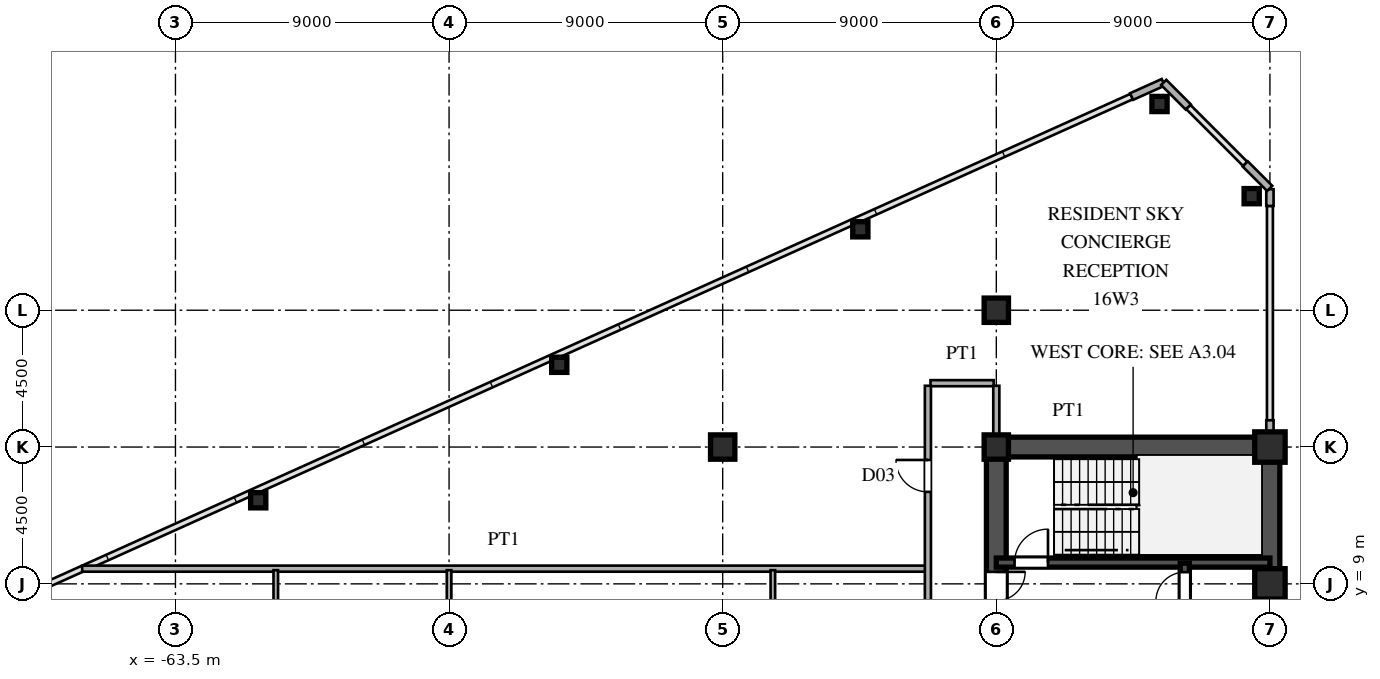
"""IFC4 building model, lengths in metres.
Left out: names, types, materials, properties, quantities, classifications, styles, units other than length and angle.
Written with IfcOpenShell. Run it as: python <this file> out.ifc"""

import sys

from ifc_helpers import new_model, si_unit, direction, frame, frame_2d, origin, origin_2d, place, context, subcontext, project, spatial, rectangle, hollow_rectangle, i_section, extrude, source, transform, mapped, element, fill, save


model = new_model("IFC4")
c1 = context("Model", 3, precision=1e-05, world=origin(), true_north=direction((0.0, 1.0)))
c2 = subcontext(c1, "Body", "Model", "MODEL_VIEW")
j1 = project(units=[si_unit("LENGTHUNIT", "METRE"), si_unit("PLANEANGLEUNIT", "RADIAN")], contexts=[c1])
p1 = place(None, origin())
s1 = spatial("IfcSite", under=j1, at=p1, CompositionType="ELEMENT")
p2 = place(p1, origin())
s2 = spatial("IfcBuilding", under=s1, at=p2, CompositionType="ELEMENT")
p3 = place(p2, frame((0.0, 0.0, 62.1)))
s3 = spatial("IfcBuildingStorey", under=s2, at=p3, CompositionType="ELEMENT", Elevation=62.1)
m1 = source(origin(), c2, "Body", "SweptSolid", [
    extrude(hollow_rectangle(XDim=1.0, YDim=1.0, WallThickness=0.042, at=origin_2d()), origin(), (0.0, 0.0, 1.0), 3.6),
])
for number, where, z_axis, x_axis in (
    (1, (-27.5, 9.0, 0.0), (0.0, 0.0, 1.0), (1.0, 0.0, 0.0)),
    (2, (-27.5, 13.5, 0.0), (0.0, 0.0, 1.0), (1.0, 0.0, 0.0)),
):
    element("IfcColumn", number, at=place(p3, frame(where, z_axis=z_axis, x_axis=x_axis)), inside=s3, PredefinedType="COLUMN", context=c2, shape_type="MappedRepresentation", body=[
        mapped(m1, transform((0.0, 0.0, 0.0), scale=1.0)),
    ])
m2 = source(origin(), c2, "Body", "SweptSolid", [
    extrude(i_section(OverallWidth=0.8, OverallDepth=0.8, WebThickness=0.032, FlangeThickness=0.05, at=origin_2d()), origin(), (0.0, 0.0, 1.0), 3.6),
])
for number, where, z_axis, x_axis in (
    (3, (-36.5, 13.5, 0.0), (0.0, 0.0, 1.0), (1.0, 0.0, 0.0)),
    (4, (-36.5, 18.0, 0.0), (0.0, 0.0, 1.0), (1.0, 0.0, 0.0)),
    (5, (-45.5, 13.5, 0.0), (0.0, 0.0, 1.0), (1.0, 0.0, 0.0)),
):
    element("IfcColumn", number, at=place(p3, frame(where, z_axis=z_axis, x_axis=x_axis)), inside=s3, PredefinedType="COLUMN", context=c2, shape_type="MappedRepresentation", body=[
        mapped(m2, transform((0.0, 0.0, 0.0), scale=1.0)),
    ])
m3 = source(origin(), c2, "Body", "SweptSolid", [
    extrude(hollow_rectangle(XDim=0.5, YDim=0.5, WallThickness=0.02, at=origin_2d()), origin(), (0.0, 0.0, 1.0), 3.6),
])
for number, where, z_axis, x_axis in (
    (6, (-28.1, 21.751, 0.0), (0.0, 0.0, 1.0), (1.0, 0.0, 0.0)),
    (7, (-31.131, 24.783, 0.0), (0.0, 0.0, 1.0), (1.0, 0.0, 0.0)),
    (8, (-40.973, 20.661, 0.0), (0.0, 0.0, 1.0), (1.0, 0.0, 0.0)),
    (9, (-50.875, 16.205, 0.0), (0.0, 0.0, 1.0), (1.0, 0.0, 0.0)),
    (10, (-60.778, 11.749, 0.0), (0.0, 0.0, 1.0), (1.0, 0.0, 0.0)),
):
    element("IfcColumn", number, at=place(p3, frame(where, z_axis=z_axis, x_axis=x_axis)), inside=s3, PredefinedType="COLUMN", context=c2, shape_type="MappedRepresentation", body=[
        mapped(m3, transform((0.0, 0.0, 0.0), scale=1.0)),
    ])
p4 = place(p3, frame((-27.5, 13.83, 0.0), z_axis=(0.0, 0.0, 1.0), x_axis=(0.0, 1.0, 0.0)))
e11 = element("IfcWall", 11, at=p4, inside=s3, PredefinedType="SOLIDWALL", context=c2, shape_type="SweptSolid", body=[
    extrude(rectangle(XDim=0.55, YDim=0.24, at=frame_2d((0.275, 0.0))), origin(), (0.0, 0.0, 1.0), 2.88),
])
p5 = place(p3, frame((-27.5, 21.43, 0.0), z_axis=(0.0, 0.0, 1.0), x_axis=(0.0, 1.0, 0.0)))
e12 = element("IfcWall", 12, at=p5, inside=s3, PredefinedType="SOLIDWALL", context=c2, shape_type="SweptSolid", body=[
    extrude(rectangle(XDim=0.55, YDim=0.24, at=frame_2d((0.275, 0.0))), origin(), (0.0, 0.0, 1.0), 3.38),
])
for number, where, z_axis, x_axis in (
    (13, (-27.507, 22.007, 0.0), (0.0, 0.0, 1.0), (-0.707, 0.707, 0.0)),
    (14, (-30.187, 24.687, 0.0), (0.0, 0.0, 1.0), (-0.707, 0.707, 0.0)),
):
    element("IfcWall", number, at=place(p3, frame(where, z_axis=z_axis, x_axis=x_axis)), inside=s3, PredefinedType="SOLIDWALL", context=c2, shape_type="SweptSolid", body=[
        extrude(rectangle(XDim=1.14, YDim=0.24, at=frame_2d((0.57, 0.0))), origin(), (0.0, 0.0, 1.0), 3.38),
    ])
p6 = place(p3, frame((-31.009, 25.496, 0.0), z_axis=(0.0, 0.0, 1.0), x_axis=(-0.911929519623, -0.410346866979, 0.0)))
e15 = element("IfcWall", 15, at=p6, inside=s3, PredefinedType="SOLIDWALL", context=c2, shape_type="SweptSolid", body=[
    extrude(rectangle(XDim=1.14, YDim=0.24, at=frame_2d((0.57, 0.0))), origin(), (0.0, 0.0, 1.0), 3.38),
])
p7 = place(p3, frame((-27.5, 1.3, 0.0), z_axis=(0.0, 0.0, 1.0), x_axis=(0.0, 1.0, 0.0)))
e16 = element("IfcWall", 16, at=p7, inside=s3, PredefinedType="SHEAR", context=c2, shape_type="SweptSolid", body=[
    extrude(rectangle(XDim=12.2, YDim=0.65, at=frame_2d((6.1, 0.0))), origin(), (0.0, 0.0, 1.0), 3.38),
])
p8 = place(p3, frame((-36.5, 13.5, 0.0), z_axis=(0.0, 0.0, 1.0), x_axis=(1.0, 0.0, 0.0)))
e17 = element("IfcWall", 17, at=p8, inside=s3, PredefinedType="SHEAR", context=c2, shape_type="SweptSolid", body=[
    extrude(rectangle(XDim=9.0, YDim=0.65, at=frame_2d((4.5, 0.0))), origin(), (0.0, 0.0, 1.0), 3.38),
])
p9 = place(p3, frame((-36.5, 8.2, 0.0), z_axis=(0.0, 0.0, 1.0), x_axis=(0.0, 1.0, 0.0)))
e18 = element("IfcWall", 18, at=p9, inside=s3, PredefinedType="SHEAR", context=c2, shape_type="SweptSolid", body=[
    extrude(rectangle(XDim=5.45, YDim=0.65, at=frame_2d((2.725, 0.0))), origin(), (0.0, 0.0, 1.0), 3.38),
])
p10 = place(p9, frame((0.245, 0.0, 0.0)))
e19 = element("IfcOpeningElement", 19, at=p10, cuts=e18, PredefinedType="OPENING", context=c2, shape_type="SweptSolid", body=[
    extrude(rectangle(XDim=0.95, YDim=2.15, at=frame_2d((0.475, 1.075))), frame((0.0, 0.335, 0.0), z_axis=(0.0, -1.0, 0.0), x_axis=(1.0, 0.0, 0.0)), (0.0, 0.0, 1.0), 0.67),
])
p11 = place(p3, frame((-36.5, 9.7, 0.0), z_axis=(0.0, 0.0, 1.0), x_axis=(1.0, 0.0, 0.0)))
e20 = element("IfcWall", 20, at=p11, inside=s3, PredefinedType="SHEAR", context=c2, shape_type="SweptSolid", body=[
    extrude(rectangle(XDim=9.0, YDim=0.3, at=frame_2d((4.5, 0.0))), origin(), (0.0, 0.0, 1.0), 3.38),
])
p12 = place(p11, frame((0.6, 0.0, 0.0)))
e21 = element("IfcOpeningElement", 21, at=p12, cuts=e20, PredefinedType="OPENING", context=c2, shape_type="SweptSolid", body=[
    extrude(rectangle(XDim=1.1, YDim=2.2, at=frame_2d((0.55, 1.1))), frame((0.0, 0.16, 0.0), z_axis=(0.0, -1.0, 0.0), x_axis=(1.0, 0.0, 0.0)), (0.0, 0.0, 1.0), 0.32),
])
p13 = place(p3, frame((-30.3, 8.15, 0.0), z_axis=(0.0, 0.0, 1.0), x_axis=(0.0, 1.0, 0.0)))
e22 = element("IfcWall", 22, at=p13, inside=s3, PredefinedType="SHEAR", context=c2, shape_type="SweptSolid", body=[
    extrude(rectangle(XDim=1.53, YDim=0.3, at=frame_2d((0.765, 0.0))), origin(), (0.0, 0.0, 1.0), 3.38),
])
p14 = place(p13, frame((0.285, 0.0, 0.0)))
e23 = element("IfcOpeningElement", 23, at=p14, cuts=e22, PredefinedType="OPENING", context=c2, shape_type="SweptSolid", body=[
    extrude(rectangle(XDim=0.95, YDim=2.15, at=frame_2d((0.475, 1.075))), frame((0.0, 0.16, 0.0), z_axis=(0.0, -1.0, 0.0), x_axis=(1.0, 0.0, 0.0)), (0.0, 0.0, 1.0), 0.32),
])
p15 = place(p3, frame((-66.568, 9.5, 0.0), z_axis=(0.0, 0.0, 1.0), x_axis=(1.0, 0.0, 0.0)))
e24 = element("IfcWall", 24, at=p15, inside=s3, PredefinedType="PARTITIONING", context=c2, shape_type="SweptSolid", body=[
    extrude(rectangle(XDim=27.738, YDim=0.2, at=frame_2d((13.869, 0.0))), origin(), (0.0, 0.0, 1.0), 3.38),
])
p16 = place(p3, frame((-38.665, 15.6, 0.0), z_axis=(0.0, 0.0, 1.0), x_axis=(1.0, 0.0, 0.0)))
e25 = element("IfcWall", 25, at=p16, inside=s3, PredefinedType="PARTITIONING", context=c2, shape_type="SweptSolid", body=[
    extrude(rectangle(XDim=2.08, YDim=0.2, at=frame_2d((1.04, 0.0))), origin(), (0.0, 0.0, 1.0), 3.38),
])
p17 = place(p3, frame((-60.2, -9.522, 0.0), z_axis=(0.0, 0.0, 1.0), x_axis=(0.0, 1.0, 0.0)))
e26 = element("IfcWall", 26, at=p17, inside=s3, PredefinedType="PARTITIONING", context=c2, shape_type="SweptSolid", body=[
    extrude(rectangle(XDim=18.972, YDim=0.15, at=frame_2d((9.486, 0.0))), origin(), (0.0, 0.0, 1.0), 3.38),
])
p18 = place(p17, frame((2.011, 0.0, 0.0)))
e27 = element("IfcOpeningElement", 27, at=p18, cuts=e26, PredefinedType="OPENING", context=c2, shape_type="SweptSolid", body=[
    extrude(rectangle(XDim=0.95, YDim=2.15, at=frame_2d((0.475, 1.075))), frame((0.0, 0.085, 0.0), z_axis=(0.0, -1.0, 0.0), x_axis=(1.0, 0.0, 0.0)), (0.0, 0.0, 1.0), 0.17),
])
p19 = place(p17, frame((6.88, 0.0, 0.0)))
e28 = element("IfcOpeningElement", 28, at=p19, cuts=e26, PredefinedType="OPENING", context=c2, shape_type="SweptSolid", body=[
    extrude(rectangle(XDim=0.95, YDim=2.15, at=frame_2d((0.475, 1.075))), frame((0.0, 0.085, 0.0), z_axis=(0.0, -1.0, 0.0), x_axis=(1.0, 0.0, 0.0)), (0.0, 0.0, 1.0), 0.17),
])
p20 = place(p17, frame((11.547, 0.0, 0.0)))
e29 = element("IfcOpeningElement", 29, at=p20, cuts=e26, PredefinedType="OPENING", context=c2, shape_type="SweptSolid", body=[
    extrude(rectangle(XDim=0.95, YDim=2.15, at=frame_2d((0.475, 1.075))), frame((0.0, 0.085, 0.0), z_axis=(0.0, -1.0, 0.0), x_axis=(1.0, 0.0, 0.0)), (0.0, 0.0, 1.0), 0.17),
])
p21 = place(p17, frame((16.214, 0.0, 0.0)))
e30 = element("IfcOpeningElement", 30, at=p21, cuts=e26, PredefinedType="OPENING", context=c2, shape_type="SweptSolid", body=[
    extrude(rectangle(XDim=0.95, YDim=2.15, at=frame_2d((0.475, 1.075))), frame((0.0, 0.085, 0.0), z_axis=(0.0, -1.0, 0.0), x_axis=(1.0, 0.0, 0.0)), (0.0, 0.0, 1.0), 0.17),
])
p22 = place(p3, frame((-54.5, -14.595, 0.0), z_axis=(0.0, 0.0, 1.0), x_axis=(0.0, 1.0, 0.0)))
e31 = element("IfcWall", 31, at=p22, inside=s3, PredefinedType="PARTITIONING", context=c2, shape_type="SweptSolid", body=[
    extrude(rectangle(XDim=24.045, YDim=0.15, at=frame_2d((12.022, 0.0))), origin(), (0.0, 0.0, 1.0), 2.68),
])
p23 = place(p22, frame((2.011, 0.0, 0.0)))
e32 = element("IfcOpeningElement", 32, at=p23, cuts=e31, PredefinedType="OPENING", context=c2, shape_type="SweptSolid", body=[
    extrude(rectangle(XDim=0.95, YDim=2.15, at=frame_2d((0.475, 1.075))), frame((0.0, 0.085, 0.0), z_axis=(0.0, -1.0, 0.0), x_axis=(1.0, 0.0, 0.0)), (0.0, 0.0, 1.0), 0.17),
])
p24 = place(p22, frame((7.084, 0.0, 0.0)))
e33 = element("IfcOpeningElement", 33, at=p24, cuts=e31, PredefinedType="OPENING", context=c2, shape_type="SweptSolid", body=[
    extrude(rectangle(XDim=0.95, YDim=2.15, at=frame_2d((0.475, 1.075))), frame((0.0, 0.085, 0.0), z_axis=(0.0, -1.0, 0.0), x_axis=(1.0, 0.0, 0.0)), (0.0, 0.0, 1.0), 0.17),
])
p25 = place(p22, frame((16.62, 0.0, 0.0)))
e34 = element("IfcOpeningElement", 34, at=p25, cuts=e31, PredefinedType="OPENING", context=c2, shape_type="SweptSolid", body=[
    extrude(rectangle(XDim=0.95, YDim=2.15, at=frame_2d((0.475, 1.075))), frame((0.0, 0.085, 0.0), z_axis=(0.0, -1.0, 0.0), x_axis=(1.0, 0.0, 0.0)), (0.0, 0.0, 1.0), 0.17),
])
p26 = place(p3, frame((-43.85, 5.352, 0.0), z_axis=(0.0, 0.0, 1.0), x_axis=(0.0, 1.0, 0.0)))
e35 = element("IfcWall", 35, at=p26, inside=s3, PredefinedType="PARTITIONING", context=c2, shape_type="SweptSolid", body=[
    extrude(rectangle(XDim=4.098, YDim=0.15, at=frame_2d((2.049, 0.0))), origin(), (0.0, 0.0, 1.0), 3.38),
])
p27 = place(p3, frame((-38.75, -15.515, 0.0), z_axis=(0.0, 0.0, 1.0), x_axis=(0.0, 1.0, 0.0)))
e36 = element("IfcWall", 36, at=p27, inside=s3, PredefinedType="PARTITIONING", context=c2, shape_type="SweptSolid", body=[
    extrude(rectangle(XDim=31.03, YDim=0.2, at=frame_2d((15.515, 0.0))), origin(), (0.0, 0.0, 1.0), 3.38),
])
p28 = place(p27, frame((4.913, 0.0, 0.0)))
e37 = element("IfcOpeningElement", 37, at=p28, cuts=e36, PredefinedType="OPENING", context=c2, shape_type="SweptSolid", body=[
    extrude(rectangle(XDim=1.05, YDim=2.25, at=frame_2d((0.525, 1.125))), frame((0.0, 0.11, 0.0), z_axis=(0.0, -1.0, 0.0), x_axis=(1.0, 0.0, 0.0)), (0.0, 0.0, 1.0), 0.22),
])
p29 = place(p27, frame((17.28, 0.0, 0.0)))
e38 = element("IfcOpeningElement", 38, at=p29, cuts=e36, PredefinedType="OPENING", context=c2, shape_type="SweptSolid", body=[
    extrude(rectangle(XDim=1.05, YDim=2.25, at=frame_2d((0.525, 1.125))), frame((0.0, 0.11, 0.0), z_axis=(0.0, -1.0, 0.0), x_axis=(1.0, 0.0, 0.0)), (0.0, 0.0, 1.0), 0.22),
])
p30 = place(p27, frame((27.54, 0.0, 0.0)))
e39 = element("IfcOpeningElement", 39, at=p30, cuts=e36, PredefinedType="OPENING", context=c2, shape_type="SweptSolid", body=[
    extrude(rectangle(XDim=1.05, YDim=2.25, at=frame_2d((0.525, 1.125))), frame((0.0, 0.11, 0.0), z_axis=(0.0, -1.0, 0.0), x_axis=(1.0, 0.0, 0.0)), (0.0, 0.0, 1.0), 0.22),
])
p31 = place(p3, frame((-36.5, 13.83, 0.0), z_axis=(0.0, 0.0, 1.0), x_axis=(0.0, 1.0, 0.0)))
e40 = element("IfcWall", 40, at=p31, inside=s3, PredefinedType="PARTITIONING", context=c2, shape_type="SweptSolid", body=[
    extrude(rectangle(XDim=1.685, YDim=0.2, at=frame_2d((0.842, 0.0))), origin(), (0.0, 0.0, 1.0), 2.68),
])
m4 = source(origin(), c2, "Body", "SweptSolid", [
    extrude(rectangle(XDim=0.95, YDim=2.15, at=frame_2d((0.475, 1.075))), frame((0.0, 0.025, 0.0), z_axis=(0.0, -1.0, 0.0), x_axis=(1.0, 0.0, 0.0)), (0.0, 0.0, 1.0), 0.05),
])
p32 = place(p10, frame((0.95, 0.0, 0.0), z_axis=(0.0, 0.0, 1.0), x_axis=(-1.0, 0.0, 0.0)))
e41 = element("IfcDoor", 41, at=p32, inside=s3, OperationType="SINGLE_SWING_RIGHT", PredefinedType="DOOR", context=c2, shape_type="MappedRepresentation", body=[
    mapped(m4, transform((0.0, 0.0, 0.0), scale=1.0)),
])
fill(e19, e41)
m5 = source(origin(), c2, "Body", "SweptSolid", [
    extrude(rectangle(XDim=1.1, YDim=2.2, at=frame_2d((0.55, 1.1))), frame((0.0, 0.025, 0.0), z_axis=(0.0, -1.0, 0.0), x_axis=(1.0, 0.0, 0.0)), (0.0, 0.0, 1.0), 0.05),
])
p33 = place(p12, origin())
e42 = element("IfcDoor", 42, at=p33, inside=s3, OperationType="SINGLE_SWING_RIGHT", PredefinedType="DOOR", context=c2, shape_type="MappedRepresentation", body=[
    mapped(m5, transform((0.0, 0.0, 0.0), scale=1.0)),
])
fill(e21, e42)
p34 = place(p14, origin())
e43 = element("IfcDoor", 43, at=p34, inside=s3, OperationType="SINGLE_SWING_LEFT", PredefinedType="DOOR", context=c2, shape_type="MappedRepresentation", body=[
    mapped(m4, transform((0.0, 0.0, 0.0), scale=1.0)),
])
fill(e23, e43)
m6 = source(origin(), c2, "Body", "SweptSolid", [
    extrude(rectangle(XDim=1.05, YDim=2.25, at=frame_2d((0.525, 1.125))), frame((0.0, 0.025, 0.0), z_axis=(0.0, -1.0, 0.0), x_axis=(1.0, 0.0, 0.0)), (0.0, 0.0, 1.0), 0.05),
])
p35 = place(p30, origin())
e44 = element("IfcDoor", 44, at=p35, inside=s3, OperationType="SINGLE_SWING_RIGHT", PredefinedType="DOOR", context=c2, shape_type="MappedRepresentation", body=[
    mapped(m6, transform((0.0, 0.0, 0.0), scale=1.0)),
])
fill(e39, e44)
save(model, sys.argv[1])
